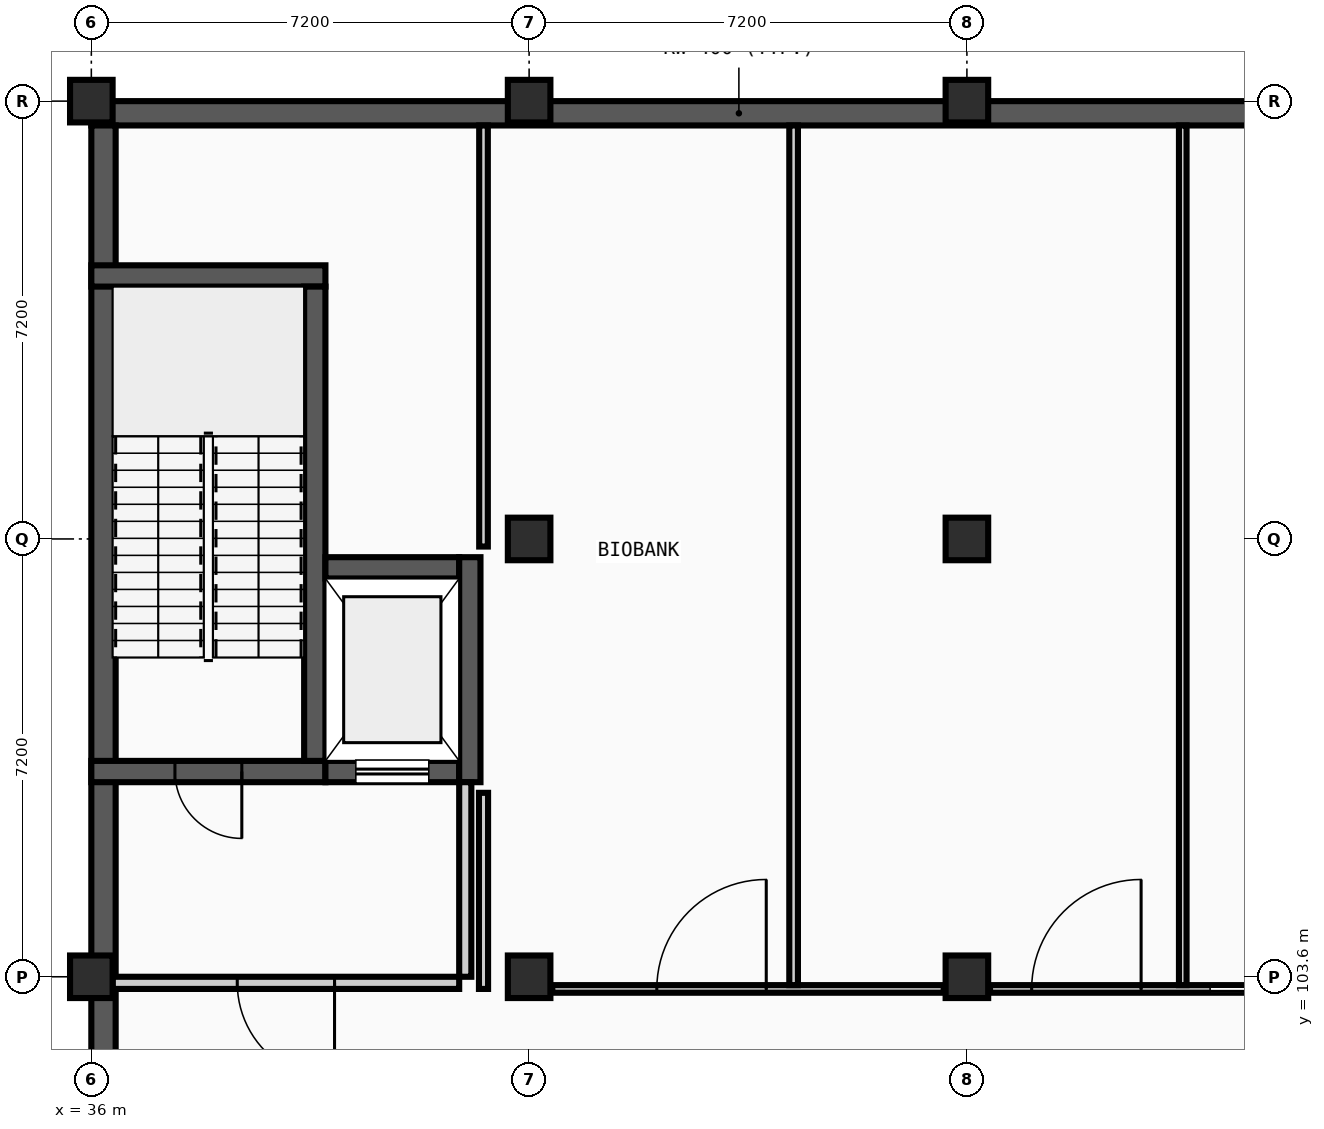
"""IFC4 building model, lengths in metres.
Left out: names, types, materials, properties, quantities, classifications, styles, units other than length and angle.
Written with IfcOpenShell. Run it as: python <this file> out.ifc"""

import sys

from ifc_helpers import new_model, si_unit, direction, frame, frame_2d, origin, origin_2d, place, context, subcontext, project, spatial, rectangle, extrude, element, fill, save


model = new_model("IFC4")
c1 = context("Model", 3, precision=1e-05, world=origin(), true_north=direction((0.0, 1.0)))
c2 = subcontext(c1, "Body", "Model", "MODEL_VIEW")
j1 = project(units=[si_unit("LENGTHUNIT", "METRE"), si_unit("PLANEANGLEUNIT", "RADIAN")], contexts=[c1])
p1 = place(None, origin())
s1 = spatial("IfcSite", under=j1, at=p1, CompositionType="ELEMENT")
p2 = place(p1, origin())
s2 = spatial("IfcBuilding", under=s1, at=p2, CompositionType="ELEMENT")
p3 = place(p2, frame((0.0, 0.0, -4.8)))
s3 = spatial("IfcBuildingStorey", under=s2, at=p3, CompositionType="ELEMENT", Elevation=-4.8)
for number, where, z_axis, x_axis in (
    (1, (36.0, 103.6, 0.0), (0.0, 0.0, 1.0), (1.0, 0.0, 0.0)),
    (2, (36.0, 118.0, 0.0), (0.0, 0.0, 1.0), (1.0, 0.0, 0.0)),
    (3, (43.2, 103.6, 0.0), (0.0, 0.0, 1.0), (1.0, 0.0, 0.0)),
    (4, (43.2, 110.8, 0.0), (0.0, 0.0, 1.0), (1.0, 0.0, 0.0)),
    (5, (43.2, 118.0, 0.0), (0.0, 0.0, 1.0), (1.0, 0.0, 0.0)),
    (6, (50.4, 103.6, 0.0), (0.0, 0.0, 1.0), (1.0, 0.0, 0.0)),
    (7, (50.4, 110.8, 0.0), (0.0, 0.0, 1.0), (1.0, 0.0, 0.0)),
    (8, (50.4, 118.0, 0.0), (0.0, 0.0, 1.0), (1.0, 0.0, 0.0)),
):
    element("IfcColumn", number, at=place(p3, frame(where, z_axis=z_axis, x_axis=x_axis)), inside=s3, PredefinedType="COLUMN", context=c2, shape_type="SweptSolid", body=[
        extrude(rectangle(XDim=0.7, YDim=0.7, at=origin_2d()), origin(), (0.0, 0.0, 1.0), 4.8),
    ])
p4 = place(p3, frame((64.8, 117.8, 0.0), z_axis=(0.0, 0.0, 1.0), x_axis=(-1.0, 0.0, 0.0)))
e9 = element("IfcWall", 9, at=p4, inside=s3, PredefinedType="USERDEFINED", context=c2, shape_type="SweptSolid", body=[
    extrude(rectangle(XDim=28.8, YDim=0.4, at=frame_2d((14.4, 0.0))), origin(), (0.0, 0.0, 1.0), 4.545),
])
p5 = place(p3, frame((36.2, 117.6, 0.0), z_axis=(0.0, 0.0, 1.0), x_axis=(0.0, -1.0, 0.0)))
e10 = element("IfcWall", 10, at=p5, inside=s3, PredefinedType="USERDEFINED", context=c2, shape_type="SweptSolid", body=[
    extrude(rectangle(XDim=38.4, YDim=0.4, at=frame_2d((19.2, 0.0))), origin(), (0.0, 0.0, 1.0), 4.545),
])
p6 = place(p3, frame((36.0, 106.975, 0.0), z_axis=(0.0, 0.0, 1.0), x_axis=(1.0, 0.0, 0.0)))
e11 = element("IfcWall", 11, at=p6, inside=s3, PredefinedType="SHEAR", context=c2, shape_type="SweptSolid", body=[
    extrude(rectangle(XDim=3.85, YDim=0.35, at=frame_2d((1.925, 0.0))), origin(), (0.0, 0.0, 1.0), 4.545),
])
p7 = place(p6, frame((1.375, 0.0, 0.0)))
e12 = element("IfcOpeningElement", 12, at=p7, cuts=e11, PredefinedType="OPENING", context=c2, shape_type="SweptSolid", body=[
    extrude(rectangle(XDim=1.1, YDim=2.15, at=frame_2d((0.55, 1.075))), frame((0.0, 0.185, 0.0), z_axis=(0.0, -1.0, 0.0), x_axis=(1.0, 0.0, 0.0)), (0.0, 0.0, 1.0), 0.37),
])
p8 = place(p3, frame((36.0, 115.125, 0.0), z_axis=(0.0, 0.0, 1.0), x_axis=(1.0, 0.0, 0.0)))
e13 = element("IfcWall", 13, at=p8, inside=s3, PredefinedType="SHEAR", context=c2, shape_type="SweptSolid", body=[
    extrude(rectangle(XDim=3.85, YDim=0.35, at=frame_2d((1.925, 0.0))), origin(), (0.0, 0.0, 1.0), 4.545),
])
p9 = place(p3, frame((39.675, 107.15, 0.0), z_axis=(0.0, 0.0, 1.0), x_axis=(0.0, 1.0, 0.0)))
e14 = element("IfcWall", 14, at=p9, inside=s3, PredefinedType="SHEAR", context=c2, shape_type="SweptSolid", body=[
    extrude(rectangle(XDim=7.8, YDim=0.35, at=frame_2d((3.9, 0.0))), origin(), (0.0, 0.0, 1.0), 4.545),
])
p10 = place(p3, frame((39.85, 106.975, 0.0), z_axis=(0.0, 0.0, 1.0), x_axis=(1.0, 0.0, 0.0)))
e15 = element("IfcWall", 15, at=p10, inside=s3, PredefinedType="SHEAR", context=c2, shape_type="SweptSolid", body=[
    extrude(rectangle(XDim=2.2, YDim=0.35, at=frame_2d((1.1, 0.0))), origin(), (0.0, 0.0, 1.0), 4.545),
])
p11 = place(p10, frame((0.5, 0.0, 0.0)))
e16 = element("IfcOpeningElement", 16, at=p11, cuts=e15, PredefinedType="OPENING", context=c2, shape_type="SweptSolid", body=[
    extrude(rectangle(XDim=1.2, YDim=2.2, at=frame_2d((0.6, 1.1))), frame((0.0, 0.185, 0.0), z_axis=(0.0, -1.0, 0.0), x_axis=(1.0, 0.0, 0.0)), (0.0, 0.0, 1.0), 0.37),
])
p12 = place(p3, frame((39.85, 110.325, 0.0), z_axis=(0.0, 0.0, 1.0), x_axis=(1.0, 0.0, 0.0)))
e17 = element("IfcWall", 17, at=p12, inside=s3, PredefinedType="SHEAR", context=c2, shape_type="SweptSolid", body=[
    extrude(rectangle(XDim=2.2, YDim=0.35, at=frame_2d((1.1, 0.0))), origin(), (0.0, 0.0, 1.0), 4.545),
])
p13 = place(p3, frame((42.225, 106.8, 0.0), z_axis=(0.0, 0.0, 1.0), x_axis=(0.0, 1.0, 0.0)))
e18 = element("IfcWall", 18, at=p13, inside=s3, PredefinedType="SHEAR", context=c2, shape_type="SweptSolid", body=[
    extrude(rectangle(XDim=3.7, YDim=0.35, at=frame_2d((1.85, 0.0))), origin(), (0.0, 0.0, 1.0), 4.545),
])
p14 = place(p3, frame((36.35, 103.5, 0.0), z_axis=(0.0, 0.0, 1.0), x_axis=(1.0, 0.0, 0.0)))
e19 = element("IfcWall", 19, at=p14, inside=s3, PredefinedType="PARTITIONING", context=c2, shape_type="SweptSolid", body=[
    extrude(rectangle(XDim=5.7, YDim=0.2, at=frame_2d((2.85, 0.0))), origin(), (0.0, 0.0, 1.0), 4.095),
])
p15 = place(p14, frame((2.05, 0.0, 0.0)))
e20 = element("IfcOpeningElement", 20, at=p15, cuts=e19, PredefinedType="OPENING", context=c2, shape_type="SweptSolid", body=[
    extrude(rectangle(XDim=1.6, YDim=2.2, at=frame_2d((0.8, 1.1))), frame((0.0, 0.11, 0.0), z_axis=(0.0, -1.0, 0.0), x_axis=(1.0, 0.0, 0.0)), (0.0, 0.0, 1.0), 0.22),
])
p16 = place(p3, frame((42.15, 103.6, 0.0), z_axis=(0.0, 0.0, 1.0), x_axis=(0.0, 1.0, 0.0)))
e21 = element("IfcWall", 21, at=p16, inside=s3, PredefinedType="PARTITIONING", context=c2, shape_type="SweptSolid", body=[
    extrude(rectangle(XDim=3.2, YDim=0.2, at=frame_2d((1.6, 0.0))), origin(), (0.0, 0.0, 1.0), 4.545),
])
p17 = place(p3, frame((43.58, 103.4, 0.0), z_axis=(0.0, 0.0, 1.0), x_axis=(1.0, 0.0, 0.0)))
e22 = element("IfcWall", 22, at=p17, inside=s3, PredefinedType="PARTITIONING", context=c2, shape_type="SweptSolid", body=[
    extrude(rectangle(XDim=6.44, YDim=0.125, at=frame_2d((3.22, 0.0))), origin(), (0.0, 0.0, 1.0), 4.095),
])
p18 = place(p17, frame((1.72, 0.0, 0.0)))
e23 = element("IfcOpeningElement", 23, at=p18, cuts=e22, PredefinedType="OPENING", context=c2, shape_type="SweptSolid", body=[
    extrude(rectangle(XDim=1.8, YDim=2.3, at=frame_2d((0.9, 1.15))), frame((0.0, 0.073, 0.0), z_axis=(0.0, -1.0, 0.0), x_axis=(1.0, 0.0, 0.0)), (0.0, 0.0, 1.0), 0.145),
])
p19 = place(p3, frame((50.78, 103.4, 0.0), z_axis=(0.0, 0.0, 1.0), x_axis=(1.0, 0.0, 0.0)))
e24 = element("IfcWall", 24, at=p19, inside=s3, PredefinedType="PARTITIONING", context=c2, shape_type="SweptSolid", body=[
    extrude(rectangle(XDim=6.44, YDim=0.125, at=frame_2d((3.22, 0.0))), origin(), (0.0, 0.0, 1.0), 4.095),
])
p20 = place(p19, frame((3.62, 0.0, 0.0)))
e25 = element("IfcOpeningElement", 25, at=p20, cuts=e24, PredefinedType="OPENING", context=c2, shape_type="SweptSolid", body=[
    extrude(rectangle(XDim=1.0, YDim=2.1, at=frame_2d((0.5, 1.05))), frame((0.0, 0.073, 0.0), z_axis=(0.0, -1.0, 0.0), x_axis=(1.0, 0.0, 0.0)), (0.0, 0.0, 1.0), 0.145),
])
p21 = place(p19, frame((0.685, 0.0, 0.0)))
e26 = element("IfcOpeningElement", 26, at=p21, cuts=e24, PredefinedType="OPENING", context=c2, shape_type="SweptSolid", body=[
    extrude(rectangle(XDim=1.8, YDim=2.3, at=frame_2d((0.9, 1.15))), frame((0.0, 0.073, 0.0), z_axis=(0.0, -1.0, 0.0), x_axis=(1.0, 0.0, 0.0)), (0.0, 0.0, 1.0), 0.145),
])
p22 = place(p3, frame((42.45, 103.4, 0.0), z_axis=(0.0, 0.0, 1.0), x_axis=(0.0, 1.0, 0.0)))
e27 = element("IfcWall", 27, at=p22, inside=s3, PredefinedType="PARTITIONING", context=c2, shape_type="SweptSolid", body=[
    extrude(rectangle(XDim=3.225, YDim=0.15, at=frame_2d((1.613, 0.0))), origin(), (0.0, 0.0, 1.0), 4.545),
])
p23 = place(p3, frame((42.45, 110.675, 0.0), z_axis=(0.0, 0.0, 1.0), x_axis=(0.0, 1.0, 0.0)))
e28 = element("IfcWall", 28, at=p23, inside=s3, PredefinedType="PARTITIONING", context=c2, shape_type="SweptSolid", body=[
    extrude(rectangle(XDim=6.925, YDim=0.142, at=frame_2d((3.462, 0.0))), origin(), (0.0, 0.0, 1.0), 4.545),
])
p24 = place(p3, frame((47.55, 103.462, 0.0), z_axis=(0.0, 0.0, 1.0), x_axis=(0.0, 1.0, 0.0)))
e29 = element("IfcWall", 29, at=p24, inside=s3, PredefinedType="PARTITIONING", context=c2, shape_type="SweptSolid", body=[
    extrude(rectangle(XDim=14.138, YDim=0.142, at=frame_2d((7.069, 0.0))), origin(), (0.0, 0.0, 1.0), 4.545),
])
p25 = place(p3, frame((53.95, 103.462, 0.0), z_axis=(0.0, 0.0, 1.0), x_axis=(0.0, 1.0, 0.0)))
e30 = element("IfcWall", 30, at=p25, inside=s3, PredefinedType="PARTITIONING", context=c2, shape_type="SweptSolid", body=[
    extrude(rectangle(XDim=14.138, YDim=0.125, at=frame_2d((7.069, 0.0))), origin(), (0.0, 0.0, 1.0), 4.545),
])
p26 = place(p7, origin())
e31 = element("IfcDoor", 31, at=p26, inside=s3, OperationType="SINGLE_SWING_RIGHT", PredefinedType="DOOR", context=c2, shape_type="SweptSolid", body=[
    extrude(rectangle(XDim=1.1, YDim=2.15, at=frame_2d((0.55, 1.075))), frame((0.0, 0.025, 0.0), z_axis=(0.0, -1.0, 0.0), x_axis=(1.0, 0.0, 0.0)), (0.0, 0.0, 1.0), 0.05),
])
fill(e12, e31)
p27 = place(p11, origin())
e32 = element("IfcDoor", 32, at=p27, inside=s3, OperationType="SLIDING_TO_RIGHT", PredefinedType="DOOR", context=c2, shape_type="SweptSolid", body=[
    extrude(rectangle(XDim=1.2, YDim=2.2, at=frame_2d((0.6, 1.1))), frame((0.0, 0.025, 0.0), z_axis=(0.0, -1.0, 0.0), x_axis=(1.0, 0.0, 0.0)), (0.0, 0.0, 1.0), 0.05),
])
fill(e16, e32)
p28 = place(p15, origin())
e33 = element("IfcDoor", 33, at=p28, inside=s3, OperationType="DOUBLE_DOOR_SINGLE_SWING", PredefinedType="DOOR", context=c2, shape_type="SweptSolid", body=[
    extrude(rectangle(XDim=1.6, YDim=2.2, at=frame_2d((0.8, 1.1))), frame((0.0, 0.025, 0.0), z_axis=(0.0, -1.0, 0.0), x_axis=(1.0, 0.0, 0.0)), (0.0, 0.0, 1.0), 0.05),
])
fill(e20, e33)
p29 = place(p20, frame((1.0, 0.0, 0.0), z_axis=(0.0, 0.0, 1.0), x_axis=(-1.0, 0.0, 0.0)))
e34 = element("IfcDoor", 34, at=p29, inside=s3, OperationType="SLIDING_TO_LEFT", PredefinedType="DOOR", context=c2, shape_type="SweptSolid", body=[
    extrude(rectangle(XDim=1.0, YDim=2.1, at=frame_2d((0.5, 1.05))), frame((0.0, 0.025, 0.0), z_axis=(0.0, -1.0, 0.0), x_axis=(1.0, 0.0, 0.0)), (0.0, 0.0, 1.0), 0.05),
])
fill(e25, e34)
p30 = place(p18, frame((1.8, 0.0, 0.0), z_axis=(0.0, 0.0, 1.0), x_axis=(-1.0, 0.0, 0.0)))
e35 = element("IfcDoor", 35, at=p30, inside=s3, OperationType="DOUBLE_DOOR_SINGLE_SWING", PredefinedType="DOOR", context=c2, shape_type="SweptSolid", body=[
    extrude(rectangle(XDim=1.8, YDim=2.3, at=frame_2d((0.9, 1.15))), frame((0.0, 0.025, 0.0), z_axis=(0.0, -1.0, 0.0), x_axis=(1.0, 0.0, 0.0)), (0.0, 0.0, 1.0), 0.05),
])
fill(e23, e35)
p31 = place(p21, frame((1.8, 0.0, 0.0), z_axis=(0.0, 0.0, 1.0), x_axis=(-1.0, 0.0, 0.0)))
e36 = element("IfcDoor", 36, at=p31, inside=s3, OperationType="DOUBLE_DOOR_SINGLE_SWING", PredefinedType="DOOR", context=c2, shape_type="SweptSolid", body=[
    extrude(rectangle(XDim=1.8, YDim=2.3, at=frame_2d((0.9, 1.15))), frame((0.0, 0.025, 0.0), z_axis=(0.0, -1.0, 0.0), x_axis=(1.0, 0.0, 0.0)), (0.0, 0.0, 1.0), 0.05),
])
fill(e26, e36)
save(model, sys.argv[1])
